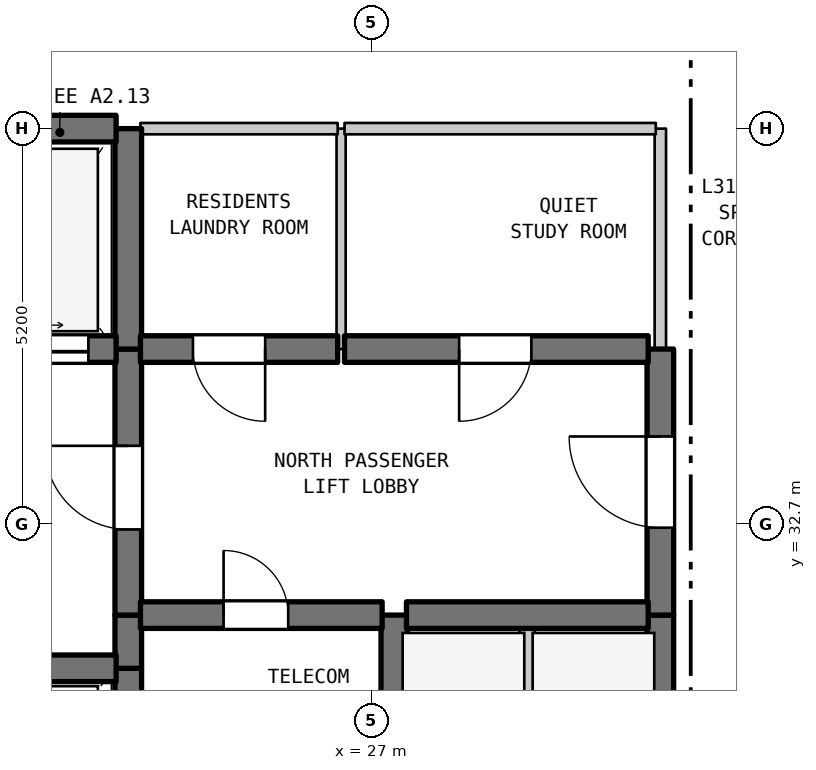
"""IFC4 building model, lengths in metres.
Left out: names, types, materials, properties, quantities, classifications, styles, units other than length and angle.
Written with IfcOpenShell. Run it as: python <this file> out.ifc"""

import sys

from ifc_helpers import new_model, si_unit, direction, frame, frame_2d, origin, place, context, subcontext, project, spatial, rectangle, extrude, element, fill, save


model = new_model("IFC4")
c1 = context("Model", 3, precision=1e-05, world=origin(), true_north=direction((0.0, 1.0)))
c2 = subcontext(c1, "Body", "Model", "MODEL_VIEW")
j1 = project(units=[si_unit("LENGTHUNIT", "METRE"), si_unit("PLANEANGLEUNIT", "RADIAN")], contexts=[c1])
p1 = place(None, origin())
s1 = spatial("IfcSite", under=j1, at=p1, CompositionType="ELEMENT")
p2 = place(p1, origin())
s2 = spatial("IfcBuilding", under=s1, at=p2, CompositionType="ELEMENT")
p3 = place(p2, frame((0.0, 0.0, 129.8)))
s3 = spatial("IfcBuildingStorey", under=s2, at=p3, CompositionType="ELEMENT", Elevation=129.8)
p4 = place(p3, frame((23.8, 29.5, 0.0), z_axis=(0.0, 0.0, 1.0), x_axis=(0.0, 1.0, 0.0)))
e1 = element("IfcWall", 1, at=p4, inside=s3, PredefinedType="SHEAR", context=c2, shape_type="SweptSolid", body=[
    extrude(rectangle(XDim=1.3, YDim=0.35, at=frame_2d((0.65, 0.0))), origin(), (0.0, 0.0, 1.0), 3.385),
])
p5 = place(p3, frame((23.8, 30.8, 0.0), z_axis=(0.0, 0.0, 1.0), x_axis=(0.0, 1.0, 0.0)))
e2 = element("IfcWall", 2, at=p5, inside=s3, PredefinedType="SHEAR", context=c2, shape_type="SweptSolid", body=[
    extrude(rectangle(XDim=0.7, YDim=0.35, at=frame_2d((0.35, 0.0))), origin(), (0.0, 0.0, 1.0), 3.385),
])
p6 = place(p3, frame((23.8, 31.5, 0.0), z_axis=(0.0, 0.0, 1.0), x_axis=(0.0, 1.0, 0.0)))
e3 = element("IfcWall", 3, at=p6, inside=s3, PredefinedType="SHEAR", context=c2, shape_type="SweptSolid", body=[
    extrude(rectangle(XDim=3.5, YDim=0.35, at=frame_2d((1.75, 0.0))), origin(), (0.0, 0.0, 1.0), 3.385),
])
p7 = place(p6, frame((1.127, 0.0, 0.0)))
e4 = element("IfcOpeningElement", 4, at=p7, cuts=e3, PredefinedType="OPENING", context=c2, shape_type="SweptSolid", body=[
    extrude(rectangle(XDim=1.1, YDim=2.15, at=frame_2d((0.55, 1.075))), frame((0.0, 0.185, 0.0), z_axis=(0.0, -1.0, 0.0), x_axis=(1.0, 0.0, 0.0)), (0.0, 0.0, 1.0), 0.37),
])
p8 = place(p3, frame((23.8, 35.0, 0.0), z_axis=(0.0, 0.0, 1.0), x_axis=(0.0, 1.0, 0.0)))
e5 = element("IfcWall", 5, at=p8, inside=s3, PredefinedType="SHEAR", context=c2, shape_type="SweptSolid", body=[
    extrude(rectangle(XDim=2.9, YDim=0.35, at=frame_2d((1.45, 0.0))), origin(), (0.0, 0.0, 1.0), 3.385),
])
p9 = place(p3, frame((26.6, 35.0, 0.0), z_axis=(0.0, 0.0, 1.0), x_axis=(0.0, 1.0, 0.0)))
e6 = element("IfcWall", 6, at=p9, inside=s3, PredefinedType="PARTITIONING", context=c2, shape_type="SweptSolid", body=[
    extrude(rectangle(XDim=2.9, YDim=0.12, at=frame_2d((1.45, 0.0))), origin(), (0.0, 0.0, 1.0), 3.385),
])
p10 = place(p3, frame((27.3, 29.5, 0.0), z_axis=(0.0, 0.0, 1.0), x_axis=(0.0, 1.0, 0.0)))
e7 = element("IfcWall", 7, at=p10, inside=s3, PredefinedType="SHEAR", context=c2, shape_type="SweptSolid", body=[
    extrude(rectangle(XDim=2.0, YDim=0.35, at=frame_2d((1.0, 0.0))), origin(), (0.0, 0.0, 1.0), 3.385),
])
p11 = place(p3, frame((29.05, 28.9, 0.0), z_axis=(0.0, 0.0, 1.0), x_axis=(0.0, 1.0, 0.0)))
e8 = element("IfcWall", 8, at=p11, inside=s3, PredefinedType="STANDARD", context=c2, shape_type="SweptSolid", body=[
    extrude(rectangle(XDim=2.6, YDim=0.2, at=frame_2d((1.3, 0.0))), origin(), (0.0, 0.0, 1.0), 3.385),
])
p12 = place(p3, frame((30.8, 28.9, 0.0), z_axis=(0.0, 0.0, 1.0), x_axis=(0.0, 1.0, 0.0)))
e9 = element("IfcWall", 9, at=p12, inside=s3, PredefinedType="SHEAR", context=c2, shape_type="SweptSolid", body=[
    extrude(rectangle(XDim=2.6, YDim=0.35, at=frame_2d((1.3, 0.0))), origin(), (0.0, 0.0, 1.0), 3.385),
])
p13 = place(p3, frame((30.8, 31.5, 0.0), z_axis=(0.0, 0.0, 1.0), x_axis=(0.0, 1.0, 0.0)))
e10 = element("IfcWall", 10, at=p13, inside=s3, PredefinedType="SHEAR", context=c2, shape_type="SweptSolid", body=[
    extrude(rectangle(XDim=3.5, YDim=0.35, at=frame_2d((1.75, 0.0))), origin(), (0.0, 0.0, 1.0), 3.385),
])
p14 = place(p13, frame((1.15, 0.0, 0.0)))
e11 = element("IfcOpeningElement", 11, at=p14, cuts=e10, PredefinedType="OPENING", context=c2, shape_type="SweptSolid", body=[
    extrude(rectangle(XDim=1.2, YDim=2.2, at=frame_2d((0.6, 1.1))), frame((0.0, 0.185, 0.0), z_axis=(0.0, -1.0, 0.0), x_axis=(1.0, 0.0, 0.0)), (0.0, 0.0, 1.0), 0.37),
])
p15 = place(p3, frame((30.8, 35.0, 0.0), z_axis=(0.0, 0.0, 1.0), x_axis=(0.0, 1.0, 0.0)))
e12 = element("IfcWall", 12, at=p15, inside=s3, PredefinedType="STANDARD", context=c2, shape_type="SweptSolid", body=[
    extrude(rectangle(XDim=2.9, YDim=0.15, at=frame_2d((1.45, 0.0))), origin(), (0.0, 0.0, 1.0), 3.385),
])
p16 = place(p3, frame((19.16, 30.8, 0.0), z_axis=(0.0, 0.0, 1.0), x_axis=(1.0, 0.0, 0.0)))
e13 = element("IfcWall", 13, at=p16, inside=s3, PredefinedType="SHEAR", context=c2, shape_type="SweptSolid", body=[
    extrude(rectangle(XDim=4.48, YDim=0.35, at=frame_2d((2.24, 0.0))), origin(), (0.0, 0.0, 1.0), 3.385),
])
p17 = place(p3, frame((23.96, 31.5, 0.0), z_axis=(0.0, 0.0, 1.0), x_axis=(1.0, 0.0, 0.0)))
e14 = element("IfcWall", 14, at=p17, inside=s3, PredefinedType="SHEAR", context=c2, shape_type="SweptSolid", body=[
    extrude(rectangle(XDim=3.18, YDim=0.35, at=frame_2d((1.59, 0.0))), origin(), (0.0, 0.0, 1.0), 3.385),
])
p18 = place(p17, frame((1.094, 0.0, 0.0)))
e15 = element("IfcOpeningElement", 15, at=p18, cuts=e14, PredefinedType="OPENING", context=c2, shape_type="SweptSolid", body=[
    extrude(rectangle(XDim=0.85, YDim=2.1, at=frame_2d((0.425, 1.05))), frame((0.0, 0.185, 0.0), z_axis=(0.0, -1.0, 0.0), x_axis=(1.0, 0.0, 0.0)), (0.0, 0.0, 1.0), 0.37),
])
p19 = place(p3, frame((27.46, 31.5, 0.0), z_axis=(0.0, 0.0, 1.0), x_axis=(1.0, 0.0, 0.0)))
e16 = element("IfcWall", 16, at=p19, inside=s3, PredefinedType="SHEAR", context=c2, shape_type="SweptSolid", body=[
    extrude(rectangle(XDim=3.18, YDim=0.35, at=frame_2d((1.59, 0.0))), origin(), (0.0, 0.0, 1.0), 3.385),
])
p20 = place(p3, frame((19.16, 35.0, 0.0), z_axis=(0.0, 0.0, 1.0), x_axis=(1.0, 0.0, 0.0)))
e17 = element("IfcWall", 17, at=p20, inside=s3, PredefinedType="SHEAR", context=c2, shape_type="SweptSolid", body=[
    extrude(rectangle(XDim=4.48, YDim=0.35, at=frame_2d((2.24, 0.0))), origin(), (0.0, 0.0, 1.0), 3.385),
])
p21 = place(p20, frame((0.365, 0.0, 0.0)))
e18 = element("IfcOpeningElement", 18, at=p21, cuts=e17, PredefinedType="OPENING", context=c2, shape_type="SweptSolid", body=[
    extrude(rectangle(XDim=1.35, YDim=2.2, at=frame_2d((0.675, 1.1))), frame((0.0, 0.185, 0.0), z_axis=(0.0, -1.0, 0.0), x_axis=(1.0, 0.0, 0.0)), (0.0, 0.0, 1.0), 0.37),
])
p22 = place(p20, frame((2.765, 0.0, 0.0)))
e19 = element("IfcOpeningElement", 19, at=p22, cuts=e17, PredefinedType="OPENING", context=c2, shape_type="SweptSolid", body=[
    extrude(rectangle(XDim=1.35, YDim=2.2, at=frame_2d((0.675, 1.1))), frame((0.0, 0.185, 0.0), z_axis=(0.0, -1.0, 0.0), x_axis=(1.0, 0.0, 0.0)), (0.0, 0.0, 1.0), 0.37),
])
p23 = place(p3, frame((23.96, 35.0, 0.0), z_axis=(0.0, 0.0, 1.0), x_axis=(1.0, 0.0, 0.0)))
e20 = element("IfcWall", 20, at=p23, inside=s3, PredefinedType="SHEAR", context=c2, shape_type="SweptSolid", body=[
    extrude(rectangle(XDim=2.595, YDim=0.35, at=frame_2d((1.297, 0.0))), origin(), (0.0, 0.0, 1.0), 3.385),
])
p24 = place(p23, frame((0.691, 0.0, 0.0)))
e21 = element("IfcOpeningElement", 21, at=p24, cuts=e20, PredefinedType="OPENING", context=c2, shape_type="SweptSolid", body=[
    extrude(rectangle(XDim=0.95, YDim=2.15, at=frame_2d((0.475, 1.075))), frame((0.0, 0.185, 0.0), z_axis=(0.0, -1.0, 0.0), x_axis=(1.0, 0.0, 0.0)), (0.0, 0.0, 1.0), 0.37),
])
p25 = place(p3, frame((26.645, 35.0, 0.0), z_axis=(0.0, 0.0, 1.0), x_axis=(1.0, 0.0, 0.0)))
e22 = element("IfcWall", 22, at=p25, inside=s3, PredefinedType="SHEAR", context=c2, shape_type="SweptSolid", body=[
    extrude(rectangle(XDim=3.995, YDim=0.35, at=frame_2d((1.998, 0.0))), origin(), (0.0, 0.0, 1.0), 3.385),
])
p26 = place(p25, frame((1.508, 0.0, 0.0)))
e23 = element("IfcOpeningElement", 23, at=p26, cuts=e22, PredefinedType="OPENING", context=c2, shape_type="SweptSolid", body=[
    extrude(rectangle(XDim=0.95, YDim=2.15, at=frame_2d((0.475, 1.075))), frame((0.0, 0.185, 0.0), z_axis=(0.0, -1.0, 0.0), x_axis=(1.0, 0.0, 0.0)), (0.0, 0.0, 1.0), 0.37),
])
p27 = place(p3, frame((19.16, 37.9, 0.0), z_axis=(0.0, 0.0, 1.0), x_axis=(1.0, 0.0, 0.0)))
e24 = element("IfcWall", 24, at=p27, inside=s3, PredefinedType="SHEAR", context=c2, shape_type="SweptSolid", body=[
    extrude(rectangle(XDim=4.48, YDim=0.35, at=frame_2d((2.24, 0.0))), origin(), (0.0, 0.0, 1.0), 3.385),
])
p28 = place(p3, frame((23.96, 37.9, 0.0), z_axis=(0.0, 0.0, 1.0), x_axis=(1.0, 0.0, 0.0)))
e25 = element("IfcWall", 25, at=p28, inside=s3, PredefinedType="STANDARD", context=c2, shape_type="SweptSolid", body=[
    extrude(rectangle(XDim=2.595, YDim=0.15, at=frame_2d((1.297, 0.0))), origin(), (0.0, 0.0, 1.0), 2.885),
])
p29 = place(p3, frame((26.645, 37.9, 0.0), z_axis=(0.0, 0.0, 1.0), x_axis=(1.0, 0.0, 0.0)))
e26 = element("IfcWall", 26, at=p29, inside=s3, PredefinedType="STANDARD", context=c2, shape_type="SweptSolid", body=[
    extrude(rectangle(XDim=4.095, YDim=0.15, at=frame_2d((2.047, 0.0))), origin(), (0.0, 0.0, 1.0), 2.885),
])
p30 = place(p7, origin())
e27 = element("IfcDoor", 27, at=p30, inside=s3, OperationType="SINGLE_SWING_RIGHT", PredefinedType="DOOR", context=c2, shape_type="SweptSolid", body=[
    extrude(rectangle(XDim=1.1, YDim=2.15, at=frame_2d((0.55, 1.075))), frame((0.0, 0.025, 0.0), z_axis=(0.0, -1.0, 0.0), x_axis=(1.0, 0.0, 0.0)), (0.0, 0.0, 1.0), 0.05),
])
fill(e4, e27)
p31 = place(p14, origin())
e28 = element("IfcDoor", 28, at=p31, inside=s3, OperationType="SINGLE_SWING_RIGHT", PredefinedType="DOOR", context=c2, shape_type="SweptSolid", body=[
    extrude(rectangle(XDim=1.2, YDim=2.2, at=frame_2d((0.6, 1.1))), frame((0.0, 0.025, 0.0), z_axis=(0.0, -1.0, 0.0), x_axis=(1.0, 0.0, 0.0)), (0.0, 0.0, 1.0), 0.05),
])
fill(e11, e28)
p32 = place(p18, origin())
e29 = element("IfcDoor", 29, at=p32, inside=s3, OperationType="SINGLE_SWING_LEFT", PredefinedType="DOOR", context=c2, shape_type="SweptSolid", body=[
    extrude(rectangle(XDim=0.85, YDim=2.1, at=frame_2d((0.425, 1.05))), frame((0.0, 0.025, 0.0), z_axis=(0.0, -1.0, 0.0), x_axis=(1.0, 0.0, 0.0)), (0.0, 0.0, 1.0), 0.05),
])
fill(e15, e29)
p33 = place(p22, origin())
e30 = element("IfcDoor", 30, at=p33, inside=s3, OperationType="DOUBLE_DOOR_SLIDING", PredefinedType="DOOR", context=c2, shape_type="SweptSolid", body=[
    extrude(rectangle(XDim=1.35, YDim=2.2, at=frame_2d((0.675, 1.1))), frame((0.0, 0.025, 0.0), z_axis=(0.0, -1.0, 0.0), x_axis=(1.0, 0.0, 0.0)), (0.0, 0.0, 1.0), 0.05),
])
fill(e19, e30)
p34 = place(p24, frame((0.95, 0.0, 0.0), z_axis=(0.0, 0.0, 1.0), x_axis=(-1.0, 0.0, 0.0)))
e31 = element("IfcDoor", 31, at=p34, inside=s3, OperationType="SINGLE_SWING_RIGHT", PredefinedType="DOOR", context=c2, shape_type="SweptSolid", body=[
    extrude(rectangle(XDim=0.95, YDim=2.15, at=frame_2d((0.475, 1.075))), frame((0.0, 0.025, 0.0), z_axis=(0.0, -1.0, 0.0), x_axis=(1.0, 0.0, 0.0)), (0.0, 0.0, 1.0), 0.05),
])
fill(e21, e31)
p35 = place(p26, frame((0.95, 0.0, 0.0), z_axis=(0.0, 0.0, 1.0), x_axis=(-1.0, 0.0, 0.0)))
e32 = element("IfcDoor", 32, at=p35, inside=s3, OperationType="SINGLE_SWING_LEFT", PredefinedType="DOOR", context=c2, shape_type="SweptSolid", body=[
    extrude(rectangle(XDim=0.95, YDim=2.15, at=frame_2d((0.475, 1.075))), frame((0.0, 0.025, 0.0), z_axis=(0.0, -1.0, 0.0), x_axis=(1.0, 0.0, 0.0)), (0.0, 0.0, 1.0), 0.05),
])
fill(e23, e32)
save(model, sys.argv[1])
